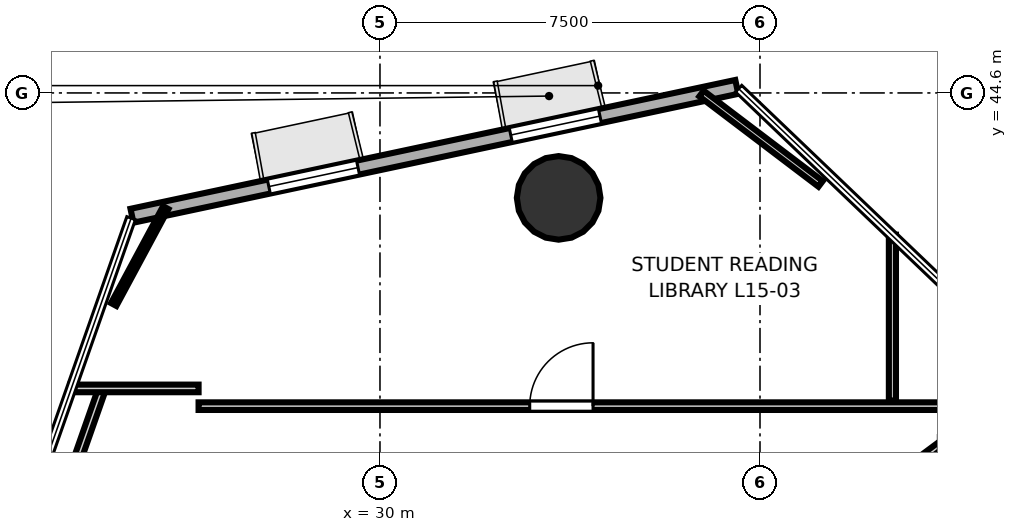
"""IFC4 building model, lengths in metres.
Left out: names, types, materials, properties, quantities, classifications, styles, units other than length and angle.
Written with IfcOpenShell. Run it as: python <this file> out.ifc"""

import sys

from ifc_helpers import new_model, si_unit, direction, frame, frame_2d, origin, origin_2d, place, context, subcontext, project, spatial, rectangle, hollow_circle, extrude, element, fill, save


model = new_model("IFC4")
c1 = context("Model", 3, precision=1e-05, world=origin(), true_north=direction((0.0, 1.0)))
c2 = subcontext(c1, "Body", "Model", "MODEL_VIEW")
j1 = project(units=[si_unit("LENGTHUNIT", "METRE"), si_unit("PLANEANGLEUNIT", "RADIAN")], contexts=[c1])
p1 = place(None, origin())
s1 = spatial("IfcSite", under=j1, at=p1, CompositionType="ELEMENT")
p2 = place(p1, origin())
s2 = spatial("IfcBuilding", under=s1, at=p2, CompositionType="ELEMENT")
p3 = place(p2, frame((0.0, 0.0, 63.6)))
s3 = spatial("IfcBuildingStorey", under=s2, at=p3, CompositionType="ELEMENT", Elevation=63.6)
p4 = place(p3, frame((33.526, 42.529, 0.0), z_axis=(0.0, 0.0, 1.0), x_axis=(1.0, 0.0, 0.0)))
e1 = element("IfcColumn", 1, at=p4, inside=s3, PredefinedType="COLUMN", context=c2, shape_type="SweptSolid", body=[
    extrude(hollow_circle(Radius=0.825, WallThickness=0.04, at=origin_2d()), origin(), (0.0, 0.0, 1.0), 3.7),
])
p5 = place(p3, frame((37.042, 44.719, 0.0), z_axis=(0.0, 0.0, 1.0), x_axis=(-0.978053480736, -0.208353998811, 0.0)))
e2 = element("IfcWall", 2, at=p5, inside=s3, PredefinedType="SOLIDWALL", context=c2, shape_type="SweptSolid", body=[
    extrude(rectangle(XDim=12.204, YDim=0.28, at=frame_2d((6.102, 0.0))), origin(), (0.0, 0.0, 1.0), 3.52),
])
p6 = place(p5, frame((2.761, 0.0, 0.85)))
e3 = element("IfcOpeningElement", 3, at=p6, cuts=e2, PredefinedType="OPENING", context=c2, shape_type="SweptSolid", body=[
    extrude(rectangle(XDim=1.8, YDim=2.1, at=frame_2d((0.9, 1.05))), frame((0.0, 0.15, 0.0), z_axis=(0.0, -1.0, 0.0), x_axis=(1.0, 0.0, 0.0)), (0.0, 0.0, 1.0), 0.3),
])
p7 = place(p5, frame((7.643, 0.0, 0.85)))
e4 = element("IfcOpeningElement", 4, at=p7, cuts=e2, PredefinedType="OPENING", context=c2, shape_type="SweptSolid", body=[
    extrude(rectangle(XDim=1.8, YDim=2.1, at=frame_2d((0.9, 1.05))), frame((0.0, 0.15, 0.0), z_axis=(0.0, -1.0, 0.0), x_axis=(1.0, 0.0, 0.0)), (0.0, 0.0, 1.0), 0.3),
])
p8 = place(p3, frame((23.579, 36.094, 0.0), z_axis=(0.0, 0.0, 1.0), x_axis=(0.331492162661, 0.943457972617, 0.0)))
e5 = element("IfcWall", 5, at=p8, inside=s3, PredefinedType="PARTITIONING", context=c2, shape_type="SweptSolid", body=[
    extrude(rectangle(XDim=2.857, YDim=0.15, at=frame_2d((1.428, 0.0))), origin(), (0.0, 0.0, 1.0), 2.84),
])
p9 = place(p3, frame((23.888, 38.769, 0.0), z_axis=(0.0, 0.0, 1.0), x_axis=(1.0, 0.0, 0.0)))
e6 = element("IfcWall", 6, at=p9, inside=s3, PredefinedType="PARTITIONING", context=c2, shape_type="SweptSolid", body=[
    extrude(rectangle(XDim=2.531, YDim=0.15, at=frame_2d((1.266, 0.0))), origin(), (0.0, 0.0, 1.0), 2.84),
])
p10 = place(p3, frame((26.42, 38.419, 0.0), z_axis=(0.0, 0.0, 1.0), x_axis=(1.0, 0.0, 0.0)))
e7 = element("IfcWall", 7, at=p10, inside=s3, PredefinedType="PARTITIONING", context=c2, shape_type="SweptSolid", body=[
    extrude(rectangle(XDim=17.232, YDim=0.15, at=frame_2d((8.616, 0.0))), origin(), (0.0, 0.0, 1.0), 2.798),
])
p11 = place(p10, frame((6.535, 0.0, 0.0)))
e8 = element("IfcOpeningElement", 8, at=p11, cuts=e7, PredefinedType="OPENING", context=c2, shape_type="SweptSolid", body=[
    extrude(rectangle(XDim=1.25, YDim=2.2, at=frame_2d((0.625, 1.1))), frame((0.0, 0.085, 0.0), z_axis=(0.0, -1.0, 0.0), x_axis=(1.0, 0.0, 0.0)), (0.0, 0.0, 1.0), 0.17),
])
p12 = place(p3, frame((42.982, 39.067, 0.0), z_axis=(0.0, 0.0, 1.0), x_axis=(-0.802826754864, -0.596212379672, 0.0)))
e9 = element("IfcWall", 9, at=p12, inside=s3, PredefinedType="PARTITIONING", context=c2, shape_type="SweptSolid", body=[
    extrude(rectangle(XDim=3.947, YDim=0.15, at=frame_2d((1.973, 0.0))), origin(), (0.0, 0.0, 1.0), 2.798),
])
p13 = place(p3, frame((40.113, 38.53, 0.0), z_axis=(0.0, 0.0, 1.0), x_axis=(0.0, 1.0, 0.0)))
e10 = element("IfcWall", 10, at=p13, inside=s3, PredefinedType="PARTITIONING", context=c2, shape_type="SweptSolid", body=[
    extrude(rectangle(XDim=3.273, YDim=0.14, at=frame_2d((1.636, 0.0))), origin(), (0.0, 0.0, 1.0), 2.84),
])
p14 = place(p3, frame((24.745, 40.425, 0.0), z_axis=(0.0, 0.0, 1.0), x_axis=(0.473616617927, 0.880731116302, 0.0)))
e11 = element("IfcWall", 11, at=p14, inside=s3, PredefinedType="PARTITIONING", context=c2, shape_type="SweptSolid", body=[
    extrude(rectangle(XDim=2.17, YDim=0.12, at=frame_2d((1.085, 0.0))), origin(), (0.0, 0.0, 1.0), 2.84),
])
p15 = place(p3, frame((36.346, 44.588, 0.0), z_axis=(0.0, 0.0, 1.0), x_axis=(0.796790215154, -0.604256032684, 0.0)))
e12 = element("IfcWall", 12, at=p15, inside=s3, PredefinedType="PARTITIONING", context=c2, shape_type="SweptSolid", body=[
    extrude(rectangle(XDim=2.949, YDim=0.14, at=frame_2d((1.475, 0.0))), origin(), (0.0, 0.0, 1.0), 2.84),
])
p16 = place(p11, origin())
e13 = element("IfcDoor", 13, at=p16, inside=s3, OperationType="SINGLE_SWING_RIGHT", PredefinedType="DOOR", context=c2, shape_type="SweptSolid", body=[
    extrude(rectangle(XDim=1.25, YDim=2.2, at=frame_2d((0.625, 1.1))), frame((0.0, 0.025, 0.0), z_axis=(0.0, -1.0, 0.0), x_axis=(1.0, 0.0, 0.0)), (0.0, 0.0, 1.0), 0.05),
])
fill(e8, e13)
p17 = place(p6, origin())
e14 = element("IfcWindow", 14, at=p17, inside=s3, PartitioningType="SINGLE_PANEL", PredefinedType="WINDOW", context=c2, shape_type="SweptSolid", body=[
    extrude(rectangle(XDim=1.8, YDim=2.1, at=frame_2d((0.9, 1.05))), frame((0.0, 0.03, 0.0), z_axis=(0.0, -1.0, 0.0), x_axis=(1.0, 0.0, 0.0)), (0.0, 0.0, 1.0), 0.06),
])
fill(e3, e14)
p18 = place(p7, origin())
e15 = element("IfcWindow", 15, at=p18, inside=s3, PartitioningType="SINGLE_PANEL", PredefinedType="WINDOW", context=c2, shape_type="SweptSolid", body=[
    extrude(rectangle(XDim=1.8, YDim=2.1, at=frame_2d((0.9, 1.05))), frame((0.0, 0.03, 0.0), z_axis=(0.0, -1.0, 0.0), x_axis=(1.0, 0.0, 0.0)), (0.0, 0.0, 1.0), 0.06),
])
fill(e4, e15)
save(model, sys.argv[1])
